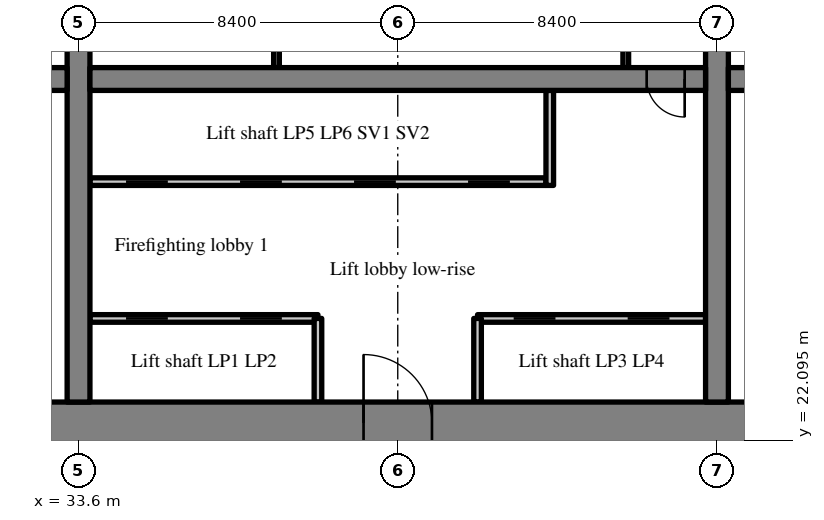
"""IFC4 building model, lengths in metres.
Left out: names, types, materials, properties, quantities, classifications, styles, units other than length and angle.
Written with IfcOpenShell. Run it as: python <this file> out.ifc"""

import sys

from ifc_helpers import new_model, si_unit, direction, frame, frame_2d, origin, place, context, subcontext, project, spatial, rectangle, extrude, source, transform, mapped, element, fill, save


model = new_model("IFC4")
c1 = context("Model", 3, precision=1e-05, world=origin(), true_north=direction((0.0, 1.0)))
c2 = subcontext(c1, "Body", "Model", "MODEL_VIEW")
j1 = project(units=[si_unit("LENGTHUNIT", "METRE"), si_unit("PLANEANGLEUNIT", "RADIAN")], contexts=[c1])
p1 = place(None, origin())
s1 = spatial("IfcSite", under=j1, at=p1, CompositionType="ELEMENT")
p2 = place(p1, origin())
s2 = spatial("IfcBuilding", under=s1, at=p2, CompositionType="ELEMENT")
p3 = place(p2, frame((0.0, 0.0, 18.0)))
s3 = spatial("IfcBuildingStorey", under=s2, at=p3, CompositionType="ELEMENT", Elevation=18.0)
m1 = source(origin(), c2, "Body", "SweptSolid", [
    extrude(rectangle(XDim=50.4, YDim=1.1, at=frame_2d((25.2, 0.0))), origin(), (0.0, 0.0, 1.0), 4.72),
])
p4 = place(p3, frame((25.2, 22.55, 0.0), z_axis=(0.0, 0.0, 1.0), x_axis=(1.0, 0.0, 0.0)))
e1 = element("IfcWall", 1, at=p4, inside=s3, PredefinedType="SHEAR", context=c2, shape_type="MappedRepresentation", body=[
    mapped(m1, transform((0.0, 0.0, 0.0), scale=1.0)),
])
m2 = source(origin(), c2, "Body", "SweptSolid", [
    extrude(rectangle(XDim=1.8, YDim=2.1, at=frame_2d((0.9, 1.05))), frame((0.0, 0.56, 0.0), z_axis=(0.0, -1.0, 0.0), x_axis=(1.0, 0.0, 0.0)), (0.0, 0.0, 1.0), 1.12),
])
p5 = place(p4, frame((15.9, 0.0, 0.0)))
e2 = element("IfcOpeningElement", 2, at=p5, cuts=e1, PredefinedType="OPENING", context=c2, shape_type="MappedRepresentation", body=[
    mapped(m2, transform((0.0, 0.0, 0.0), scale=1.0)),
])
m3 = source(origin(), c2, "Body", "SweptSolid", [
    extrude(rectangle(XDim=1.2, YDim=2.1, at=frame_2d((0.6, 1.05))), frame((0.0, 0.56, 0.0), z_axis=(0.0, -1.0, 0.0), x_axis=(1.0, 0.0, 0.0)), (0.0, 0.0, 1.0), 1.12),
])
p6 = place(p4, frame((27.0, 0.0, 0.0)))
e3 = element("IfcOpeningElement", 3, at=p6, cuts=e1, PredefinedType="OPENING", context=c2, shape_type="MappedRepresentation", body=[
    mapped(m3, transform((0.0, 0.0, 0.0), scale=1.0)),
])
m4 = source(origin(), c2, "Body", "SweptSolid", [
    extrude(rectangle(XDim=0.9, YDim=2.1, at=frame_2d((0.45, 1.05))), frame((0.0, 0.56, 0.0), z_axis=(0.0, -1.0, 0.0), x_axis=(1.0, 0.0, 0.0)), (0.0, 0.0, 1.0), 1.12),
])
p7 = place(p4, frame((34.5, 0.0, 0.0)))
e4 = element("IfcOpeningElement", 4, at=p7, cuts=e1, PredefinedType="OPENING", context=c2, shape_type="MappedRepresentation", body=[
    mapped(m4, transform((0.0, 0.0, 0.0), scale=1.0)),
])
p8 = place(p4, frame((31.5, 0.0, 0.0)))
e5 = element("IfcOpeningElement", 5, at=p8, cuts=e1, PredefinedType="OPENING", context=c2, shape_type="MappedRepresentation", body=[
    mapped(m4, transform((0.0, 0.0, 0.0), scale=1.0)),
])
p9 = place(p4, frame((39.75, 0.0, 0.0)))
e6 = element("IfcOpeningElement", 6, at=p9, cuts=e1, PredefinedType="OPENING", context=c2, shape_type="MappedRepresentation", body=[
    mapped(m4, transform((0.0, 0.0, 0.0), scale=1.0)),
])
p10 = place(p4, frame((36.75, 0.0, 0.0)))
e7 = element("IfcOpeningElement", 7, at=p10, cuts=e1, PredefinedType="OPENING", context=c2, shape_type="MappedRepresentation", body=[
    mapped(m4, transform((0.0, 0.0, 0.0), scale=1.0)),
])
p11 = place(p4, frame((6.425, 0.0, 0.0)))
e8 = element("IfcOpeningElement", 8, at=p11, cuts=e1, PredefinedType="OPENING", context=c2, shape_type="MappedRepresentation", body=[
    mapped(m3, transform((0.0, 0.0, 0.0), scale=1.0)),
])
p12 = place(p4, frame((47.675, 0.0, 0.0)))
e9 = element("IfcOpeningElement", 9, at=p12, cuts=e1, PredefinedType="OPENING", context=c2, shape_type="MappedRepresentation", body=[
    mapped(m3, transform((0.0, 0.0, 0.0), scale=1.0)),
])
m5 = source(origin(), c2, "Body", "SweptSolid", [
    extrude(rectangle(XDim=17.8, YDim=0.6, at=frame_2d((8.9, 0.0))), origin(), (0.0, 0.0, 1.0), 4.72),
])
p13 = place(p3, frame((33.6, 23.1, 0.0), z_axis=(0.0, 0.0, 1.0), x_axis=(0.0, 1.0, 0.0)))
e10 = element("IfcWall", 10, at=p13, inside=s3, PredefinedType="SHEAR", context=c2, shape_type="MappedRepresentation", body=[
    mapped(m5, transform((0.0, 0.0, 0.0), scale=1.0)),
])
m6 = source(origin(), c2, "Body", "SweptSolid", [
    extrude(rectangle(XDim=1.1, YDim=2.1, at=frame_2d((0.55, 1.05))), frame((0.0, 0.31, 0.0), z_axis=(0.0, -1.0, 0.0), x_axis=(1.0, 0.0, 0.0)), (0.0, 0.0, 1.0), 0.62),
])
p14 = place(p13, frame((12.35, 0.0, 0.0)))
e11 = element("IfcOpeningElement", 11, at=p14, cuts=e10, PredefinedType="OPENING", context=c2, shape_type="MappedRepresentation", body=[
    mapped(m6, transform((0.0, 0.0, 0.0), scale=1.0)),
])
p15 = place(p3, frame((50.4, 23.1, 0.0), z_axis=(0.0, 0.0, 1.0), x_axis=(0.0, 1.0, 0.0)))
e12 = element("IfcWall", 12, at=p15, inside=s3, PredefinedType="SHEAR", context=c2, shape_type="MappedRepresentation", body=[
    mapped(m5, transform((0.0, 0.0, 0.0), scale=1.0)),
])
p16 = place(p15, frame((12.35, 0.0, 0.0)))
e13 = element("IfcOpeningElement", 13, at=p16, cuts=e12, PredefinedType="OPENING", context=c2, shape_type="MappedRepresentation", body=[
    mapped(m6, transform((0.0, 0.0, 0.0), scale=1.0)),
])
m7 = source(origin(), c2, "Body", "SweptSolid", [
    extrude(rectangle(XDim=7.0, YDim=0.6, at=frame_2d((3.5, 0.0))), origin(), (0.0, 0.0, 1.0), 4.72),
])
p17 = place(p3, frame((26.3, 31.6, 0.0), z_axis=(0.0, 0.0, 1.0), x_axis=(1.0, 0.0, 0.0)))
e14 = element("IfcWall", 14, at=p17, inside=s3, PredefinedType="SHEAR", context=c2, shape_type="MappedRepresentation", body=[
    mapped(m7, transform((0.0, 0.0, 0.0), scale=1.0)),
])
p18 = place(p17, frame((5.375, 0.0, 0.0)))
e15 = element("IfcOpeningElement", 15, at=p18, cuts=e14, PredefinedType="OPENING", context=c2, shape_type="MappedRepresentation", body=[
    mapped(m6, transform((0.0, 0.0, 0.0), scale=1.0)),
])
m8 = source(origin(), c2, "Body", "SweptSolid", [
    extrude(rectangle(XDim=16.2, YDim=0.6, at=frame_2d((8.1, 0.0))), origin(), (0.0, 0.0, 1.0), 4.72),
])
p19 = place(p3, frame((33.9, 31.6, 0.0), z_axis=(0.0, 0.0, 1.0), x_axis=(1.0, 0.0, 0.0)))
e16 = element("IfcWall", 16, at=p19, inside=s3, PredefinedType="SHEAR", context=c2, shape_type="MappedRepresentation", body=[
    mapped(m8, transform((0.0, 0.0, 0.0), scale=1.0)),
])
m9 = source(origin(), c2, "Body", "SweptSolid", [
    extrude(rectangle(XDim=1.0, YDim=2.1, at=frame_2d((0.5, 1.05))), frame((0.0, 0.31, 0.0), z_axis=(0.0, -1.0, 0.0), x_axis=(1.0, 0.0, 0.0)), (0.0, 0.0, 1.0), 0.62),
])
p20 = place(p19, frame((14.65, 0.0, 0.0)))
e17 = element("IfcOpeningElement", 17, at=p20, cuts=e16, PredefinedType="OPENING", context=c2, shape_type="MappedRepresentation", body=[
    mapped(m9, transform((0.0, 0.0, 0.0), scale=1.0)),
])
m10 = source(origin(), c2, "Body", "SweptSolid", [
    extrude(rectangle(XDim=16.2, YDim=0.6, at=frame_2d((8.1, 0.0))), origin(), (0.0, 0.0, 1.0), 4.72),
])
p21 = place(p3, frame((50.7, 31.6, 0.0), z_axis=(0.0, 0.0, 1.0), x_axis=(1.0, 0.0, 0.0)))
e18 = element("IfcWall", 18, at=p21, inside=s3, PredefinedType="SHEAR", context=c2, shape_type="MappedRepresentation", body=[
    mapped(m10, transform((0.0, 0.0, 0.0), scale=1.0)),
])
p22 = place(p21, frame((0.55, 0.0, 0.0)))
e19 = element("IfcOpeningElement", 19, at=p22, cuts=e18, PredefinedType="OPENING", context=c2, shape_type="MappedRepresentation", body=[
    mapped(m9, transform((0.0, 0.0, 0.0), scale=1.0)),
])
m11 = source(origin(), c2, "Body", "SweptSolid", [
    extrude(rectangle(XDim=6.0, YDim=0.2, at=frame_2d((3.0, 0.0))), origin(), (0.0, 0.0, 1.0), 4.72),
])
p23 = place(p3, frame((33.9, 25.3, 0.0), z_axis=(0.0, 0.0, 1.0), x_axis=(1.0, 0.0, 0.0)))
e20 = element("IfcWall", 20, at=p23, inside=s3, PredefinedType="SOLIDWALL", context=c2, shape_type="MappedRepresentation", body=[
    mapped(m11, transform((0.0, 0.0, 0.0), scale=1.0)),
])
m12 = source(origin(), c2, "Body", "SweptSolid", [
    extrude(rectangle(XDim=1.1, YDim=2.1, at=frame_2d((0.55, 1.05))), frame((0.0, 0.11, 0.0), z_axis=(0.0, -1.0, 0.0), x_axis=(1.0, 0.0, 0.0)), (0.0, 0.0, 1.0), 0.22),
])
p24 = place(p23, frame((0.95, 0.0, 0.0)))
e21 = element("IfcOpeningElement", 21, at=p24, cuts=e20, PredefinedType="OPENING", context=c2, shape_type="MappedRepresentation", body=[
    mapped(m12, transform((0.0, 0.0, 0.0), scale=1.0)),
])
p25 = place(p23, frame((3.95, 0.0, 0.0)))
e22 = element("IfcOpeningElement", 22, at=p25, cuts=e20, PredefinedType="OPENING", context=c2, shape_type="MappedRepresentation", body=[
    mapped(m12, transform((0.0, 0.0, 0.0), scale=1.0)),
])
p26 = place(p3, frame((44.1, 25.3, 0.0), z_axis=(0.0, 0.0, 1.0), x_axis=(1.0, 0.0, 0.0)))
e23 = element("IfcWall", 23, at=p26, inside=s3, PredefinedType="SOLIDWALL", context=c2, shape_type="MappedRepresentation", body=[
    mapped(m11, transform((0.0, 0.0, 0.0), scale=1.0)),
])
p27 = place(p26, frame((0.95, 0.0, 0.0)))
e24 = element("IfcOpeningElement", 24, at=p27, cuts=e23, PredefinedType="OPENING", context=c2, shape_type="MappedRepresentation", body=[
    mapped(m12, transform((0.0, 0.0, 0.0), scale=1.0)),
])
p28 = place(p26, frame((3.95, 0.0, 0.0)))
e25 = element("IfcOpeningElement", 25, at=p28, cuts=e23, PredefinedType="OPENING", context=c2, shape_type="MappedRepresentation", body=[
    mapped(m12, transform((0.0, 0.0, 0.0), scale=1.0)),
])
m13 = source(origin(), c2, "Body", "SweptSolid", [
    extrude(rectangle(XDim=12.0, YDim=0.2, at=frame_2d((6.0, 0.0))), origin(), (0.0, 0.0, 1.0), 4.72),
])
p29 = place(p3, frame((33.9, 28.9, 0.0), z_axis=(0.0, 0.0, 1.0), x_axis=(1.0, 0.0, 0.0)))
e26 = element("IfcWall", 26, at=p29, inside=s3, PredefinedType="SOLIDWALL", context=c2, shape_type="MappedRepresentation", body=[
    mapped(m13, transform((0.0, 0.0, 0.0), scale=1.0)),
])
p30 = place(p29, frame((0.95, 0.0, 0.0)))
e27 = element("IfcOpeningElement", 27, at=p30, cuts=e26, PredefinedType="OPENING", context=c2, shape_type="MappedRepresentation", body=[
    mapped(m12, transform((0.0, 0.0, 0.0), scale=1.0)),
])
p31 = place(p29, frame((3.95, 0.0, 0.0)))
e28 = element("IfcOpeningElement", 28, at=p31, cuts=e26, PredefinedType="OPENING", context=c2, shape_type="MappedRepresentation", body=[
    mapped(m12, transform((0.0, 0.0, 0.0), scale=1.0)),
])
p32 = place(p29, frame((6.95, 0.0, 0.0)))
e29 = element("IfcOpeningElement", 29, at=p32, cuts=e26, PredefinedType="OPENING", context=c2, shape_type="MappedRepresentation", body=[
    mapped(m12, transform((0.0, 0.0, 0.0), scale=1.0)),
])
p33 = place(p29, frame((9.95, 0.0, 0.0)))
e30 = element("IfcOpeningElement", 30, at=p33, cuts=e26, PredefinedType="OPENING", context=c2, shape_type="MappedRepresentation", body=[
    mapped(m12, transform((0.0, 0.0, 0.0), scale=1.0)),
])
m14 = source(origin(), c2, "Body", "SweptSolid", [
    extrude(rectangle(XDim=2.2, YDim=0.2, at=frame_2d((1.1, 0.0))), origin(), (0.0, 0.0, 1.0), 4.72),
])
for number, where, z_axis, x_axis in (
    (31, (39.9, 23.1, 0.0), (0.0, 0.0, 1.0), (0.0, 1.0, 0.0)),
    (32, (44.1, 23.1, 0.0), (0.0, 0.0, 1.0), (0.0, 1.0, 0.0)),
):
    element("IfcWall", number, at=place(p3, frame(where, z_axis=z_axis, x_axis=x_axis)), inside=s3, PredefinedType="SOLIDWALL", context=c2, shape_type="MappedRepresentation", body=[
        mapped(m14, transform((0.0, 0.0, 0.0), scale=1.0)),
    ])
m15 = source(origin(), c2, "Body", "SweptSolid", [
    extrude(rectangle(XDim=2.5, YDim=0.2, at=frame_2d((1.25, 0.0))), origin(), (0.0, 0.0, 1.0), 4.72),
])
p34 = place(p3, frame((46.0, 28.8, 0.0), z_axis=(0.0, 0.0, 1.0), x_axis=(0.0, 1.0, 0.0)))
e33 = element("IfcWall", 33, at=p34, inside=s3, PredefinedType="SOLIDWALL", context=c2, shape_type="MappedRepresentation", body=[
    mapped(m15, transform((0.0, 0.0, 0.0), scale=1.0)),
])
m16 = source(origin(), c2, "Body", "SweptSolid", [
    extrude(rectangle(XDim=3.1, YDim=0.15, at=frame_2d((1.55, 0.0))), origin(), (0.0, 0.0, 1.0), 4.72),
])
for number, where, z_axis, x_axis in (
    (34, (48.0, 31.9, 0.0), (0.0, 0.0, 1.0), (0.0, 1.0, 0.0)),
    (35, (38.809, 31.9, 0.0), (0.0, 0.0, 1.0), (0.0, 1.0, 0.0)),
):
    element("IfcWall", number, at=place(p3, frame(where, z_axis=z_axis, x_axis=x_axis)), inside=s3, PredefinedType="PARTITIONING", context=c2, shape_type="MappedRepresentation", body=[
        mapped(m16, transform((0.0, 0.0, 0.0), scale=1.0)),
    ])
m17 = source(origin(), c2, "Body", "SweptSolid", [
    extrude(rectangle(XDim=1.8, YDim=2.1, at=frame_2d((0.9, 1.05))), frame((0.0, 0.325, 0.0), z_axis=(0.0, -1.0, 0.0), x_axis=(1.0, 0.0, 0.0)), (0.0, 0.0, 1.0), 0.05),
])
p35 = place(p5, origin())
e36 = element("IfcDoor", 36, at=p35, inside=s3, OperationType="DOUBLE_DOOR_SINGLE_SWING", PredefinedType="DOOR", context=c2, shape_type="MappedRepresentation", body=[
    mapped(m17, transform((0.0, 0.0, 0.0), scale=1.0)),
])
fill(e2, e36)
m18 = source(origin(), c2, "Body", "SweptSolid", [
    extrude(rectangle(XDim=1.0, YDim=2.1, at=frame_2d((0.5, 1.05))), frame((0.0, 0.025, 0.0), z_axis=(0.0, -1.0, 0.0), x_axis=(1.0, 0.0, 0.0)), (0.0, 0.0, 1.0), 0.05),
])
p36 = place(p20, origin())
e37 = element("IfcDoor", 37, at=p36, inside=s3, OperationType="SINGLE_SWING_RIGHT", PredefinedType="DOOR", context=c2, shape_type="MappedRepresentation", body=[
    mapped(m18, transform((0.0, 0.0, 0.0), scale=1.0)),
])
fill(e17, e37)
m19 = source(origin(), c2, "Body", "SweptSolid", [
    extrude(rectangle(XDim=1.1, YDim=2.1, at=frame_2d((0.55, 1.05))), frame((0.0, 0.025, 0.0), z_axis=(0.0, -1.0, 0.0), x_axis=(1.0, 0.0, 0.0)), (0.0, 0.0, 1.0), 0.05),
])
p37 = place(p24, origin())
e38 = element("IfcDoor", 38, at=p37, inside=s3, OperationType="SLIDING_TO_LEFT", PredefinedType="DOOR", context=c2, shape_type="MappedRepresentation", body=[
    mapped(m19, transform((0.0, 0.0, 0.0), scale=1.0)),
])
fill(e21, e38)
p38 = place(p25, origin())
e39 = element("IfcDoor", 39, at=p38, inside=s3, OperationType="SLIDING_TO_RIGHT", PredefinedType="DOOR", context=c2, shape_type="MappedRepresentation", body=[
    mapped(m19, transform((0.0, 0.0, 0.0), scale=1.0)),
])
fill(e22, e39)
p39 = place(p27, origin())
e40 = element("IfcDoor", 40, at=p39, inside=s3, OperationType="SLIDING_TO_LEFT", PredefinedType="DOOR", context=c2, shape_type="MappedRepresentation", body=[
    mapped(m19, transform((0.0, 0.0, 0.0), scale=1.0)),
])
fill(e24, e40)
p40 = place(p28, origin())
e41 = element("IfcDoor", 41, at=p40, inside=s3, OperationType="SLIDING_TO_RIGHT", PredefinedType="DOOR", context=c2, shape_type="MappedRepresentation", body=[
    mapped(m19, transform((0.0, 0.0, 0.0), scale=1.0)),
])
fill(e25, e41)
p41 = place(p30, origin())
e42 = element("IfcDoor", 42, at=p41, inside=s3, OperationType="SLIDING_TO_LEFT", PredefinedType="DOOR", context=c2, shape_type="MappedRepresentation", body=[
    mapped(m19, transform((0.0, 0.0, 0.0), scale=1.0)),
])
fill(e27, e42)
p42 = place(p31, origin())
e43 = element("IfcDoor", 43, at=p42, inside=s3, OperationType="SLIDING_TO_RIGHT", PredefinedType="DOOR", context=c2, shape_type="MappedRepresentation", body=[
    mapped(m19, transform((0.0, 0.0, 0.0), scale=1.0)),
])
fill(e28, e43)
p43 = place(p32, origin())
e44 = element("IfcDoor", 44, at=p43, inside=s3, OperationType="SLIDING_TO_LEFT", PredefinedType="DOOR", context=c2, shape_type="MappedRepresentation", body=[
    mapped(m19, transform((0.0, 0.0, 0.0), scale=1.0)),
])
fill(e29, e44)
p44 = place(p33, origin())
e45 = element("IfcDoor", 45, at=p44, inside=s3, OperationType="SLIDING_TO_RIGHT", PredefinedType="DOOR", context=c2, shape_type="MappedRepresentation", body=[
    mapped(m19, transform((0.0, 0.0, 0.0), scale=1.0)),
])
fill(e30, e45)
save(model, sys.argv[1])
